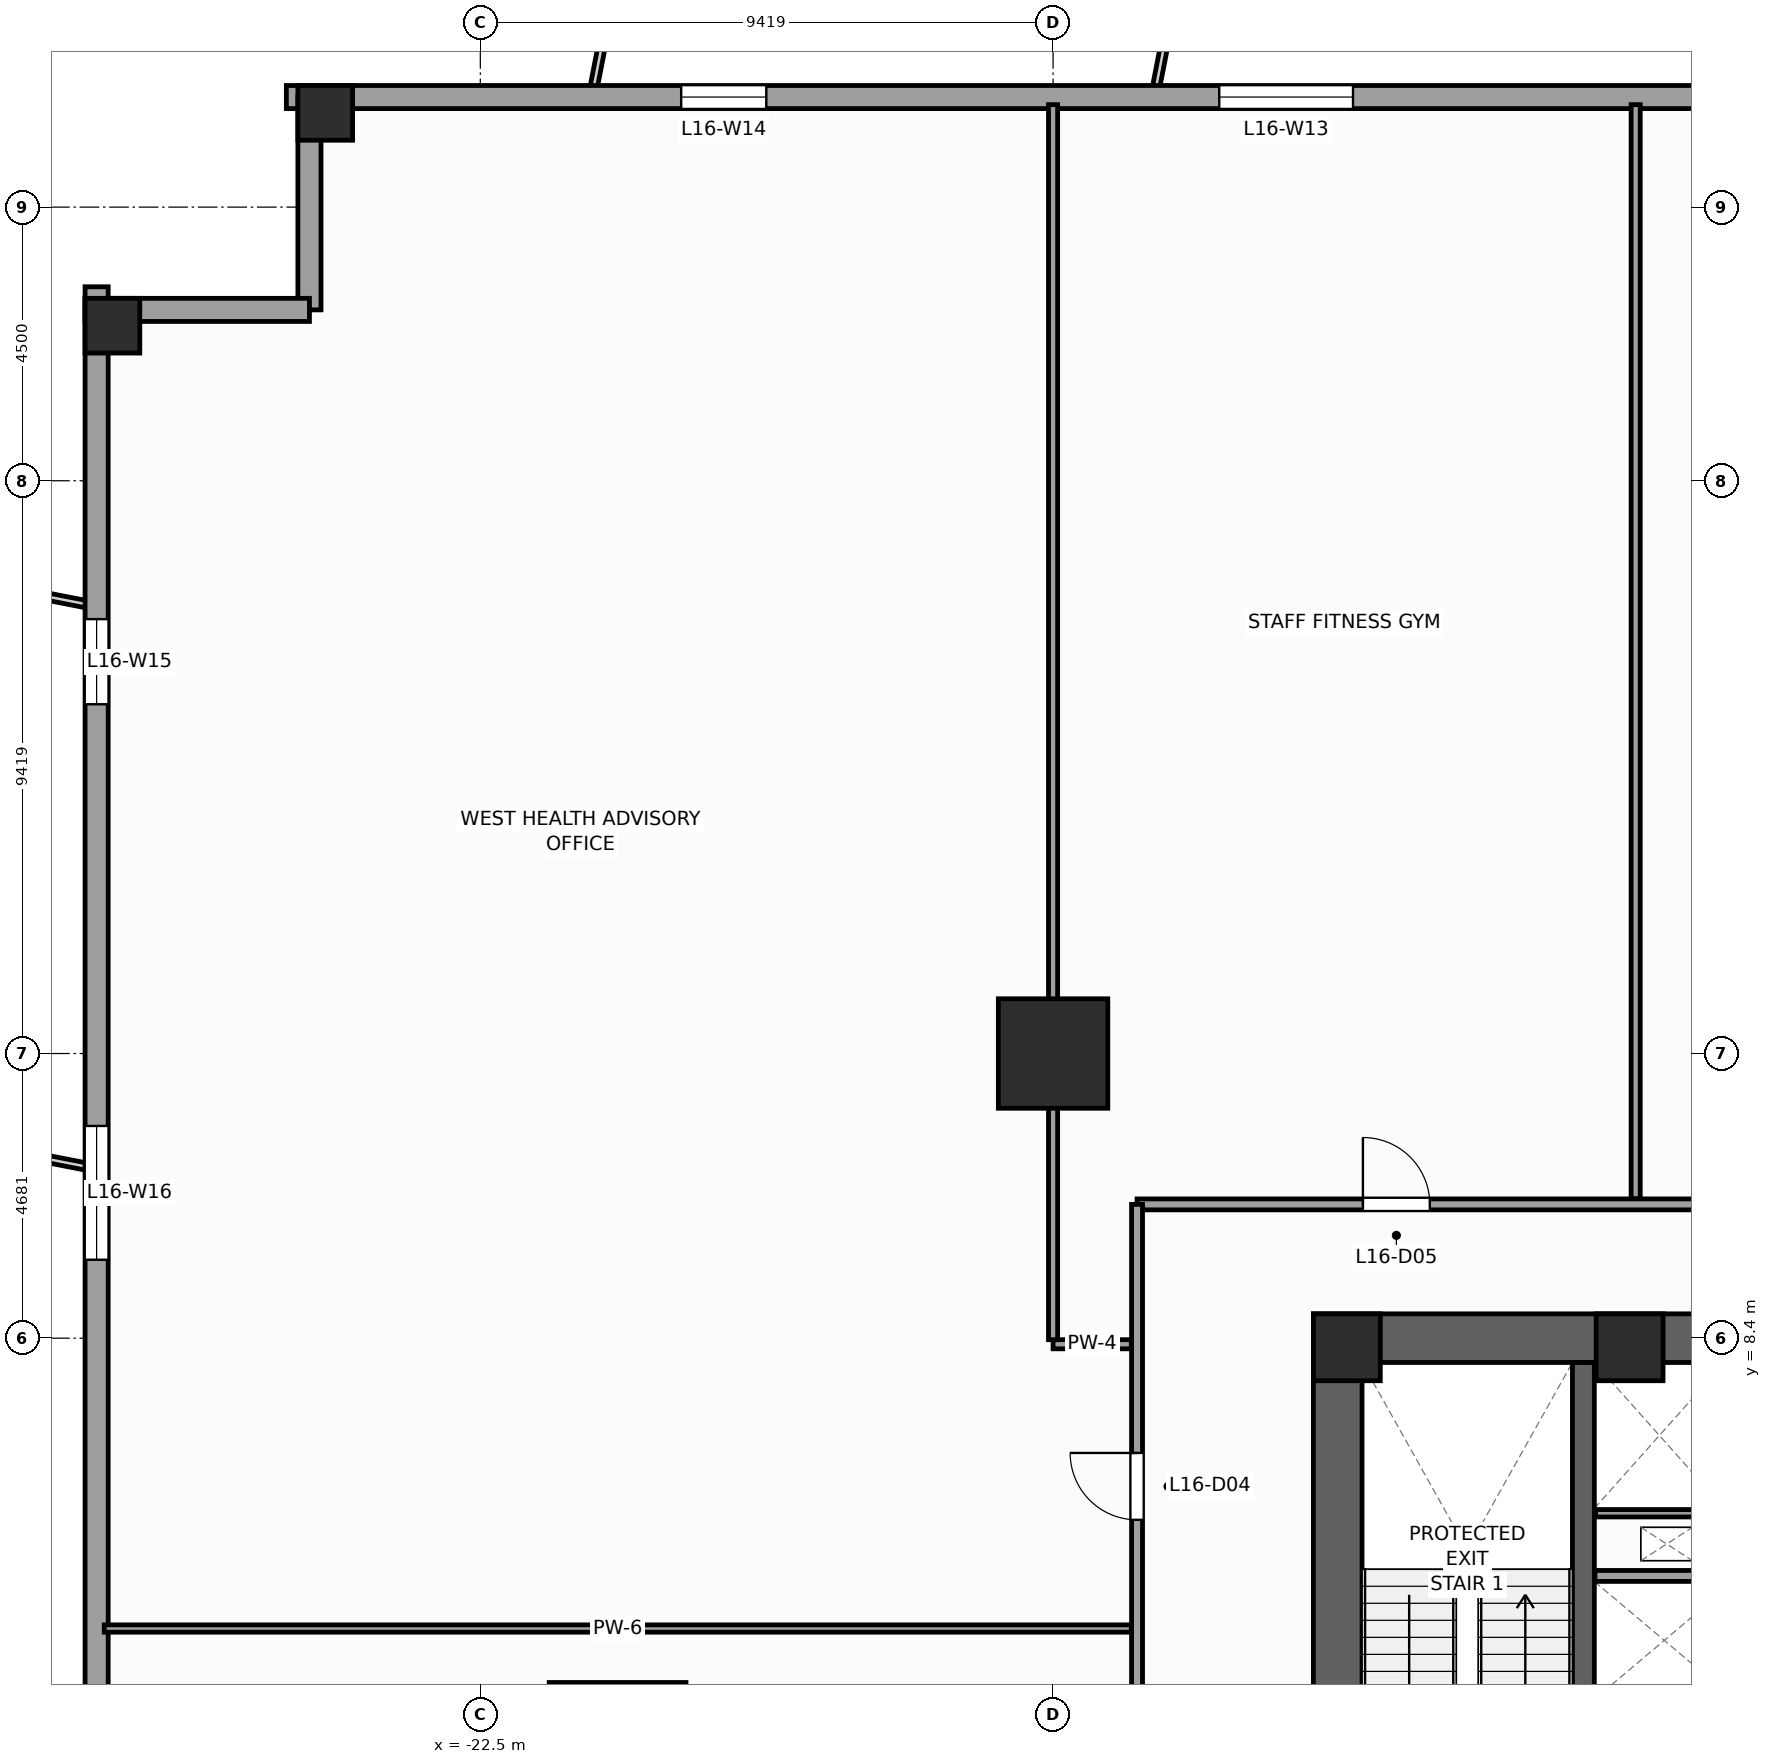
"""IFC4 building model, lengths in metres.
Left out: names, types, materials, properties, quantities, classifications, styles, units other than length and angle.
Written with IfcOpenShell. Run it as: python <this file> out.ifc"""

import sys

from ifc_helpers import new_model, si_unit, direction, frame, frame_2d, origin, origin_2d, place, context, subcontext, project, spatial, rectangle, extrude, source, transform, mapped, element, fill, save


model = new_model("IFC4")
c1 = context("Model", 3, precision=1e-05, world=origin(), true_north=direction((0.0, 1.0)))
c2 = subcontext(c1, "Body", "Model", "MODEL_VIEW")
j1 = project(units=[si_unit("LENGTHUNIT", "METRE"), si_unit("PLANEANGLEUNIT", "RADIAN")], contexts=[c1])
p1 = place(None, origin())
s1 = spatial("IfcSite", under=j1, at=p1, CompositionType="ELEMENT")
p2 = place(p1, origin())
s2 = spatial("IfcBuilding", under=s1, at=p2, CompositionType="ELEMENT")
p3 = place(p2, frame((0.0, 0.0, 70.0)))
s3 = spatial("IfcBuildingStorey", under=s2, at=p3, CompositionType="ELEMENT", Elevation=70.0)
p4 = place(p3, frame((-8.8, 8.4, 0.0), z_axis=(0.0, 0.0, 1.0), x_axis=(1.0, 0.0, 0.0)))
e1 = element("IfcWall", 1, at=p4, inside=s3, PredefinedType="SHEAR", context=c2, shape_type="SweptSolid", body=[
    extrude(rectangle(XDim=17.6, YDim=0.8, at=frame_2d((8.8, 0.0))), origin(), (0.0, 0.0, 1.0), 4.0),
])
p5 = place(p3, frame((-8.4, -8.0, 0.0), z_axis=(0.0, 0.0, 1.0), x_axis=(0.0, 1.0, 0.0)))
e2 = element("IfcWall", 2, at=p5, inside=s3, PredefinedType="SHEAR", context=c2, shape_type="SweptSolid", body=[
    extrude(rectangle(XDim=16.0, YDim=0.8, at=frame_2d((8.0, 0.0))), origin(), (0.0, 0.0, 1.0), 4.0),
])
p6 = place(p5, frame((4.69, 0.0, 0.0)))
e3 = element("IfcOpeningElement", 3, at=p6, cuts=e2, PredefinedType="OPENING", context=c2, shape_type="SweptSolid", body=[
    extrude(rectangle(XDim=1.3, YDim=2.2, at=frame_2d((0.65, 1.1))), frame((0.0, 0.41, 0.0), z_axis=(0.0, -1.0, 0.0), x_axis=(1.0, 0.0, 0.0)), (0.0, 0.0, 1.0), 0.82),
])
p7 = place(p3, frame((-4.36, -8.0, 0.0), z_axis=(0.0, 0.0, 1.0), x_axis=(0.0, 1.0, 0.0)))
e4 = element("IfcWall", 4, at=p7, inside=s3, PredefinedType="SHEAR", context=c2, shape_type="SweptSolid", body=[
    extrude(rectangle(XDim=16.0, YDim=0.36, at=frame_2d((8.0, 0.0))), origin(), (0.0, 0.0, 1.0), 4.0),
])
m1 = source(origin(), c2, "Body", "SweptSolid", [
    extrude(rectangle(XDim=1.1, YDim=1.1, at=origin_2d()), origin(), (0.0, 0.0, 1.0), 4.0),
])
for number, where, z_axis, x_axis in (
    (5, (-8.25, 8.25, 0.0), (0.0, 0.0, 1.0), (1.0, 0.0, 0.0)),
    (6, (-3.6, 8.25, 0.0), (0.0, 0.0, 1.0), (1.0, 0.0, 0.0)),
):
    element("IfcColumn", number, at=place(p3, frame(where, z_axis=z_axis, x_axis=x_axis)), inside=s3, PredefinedType="PILASTER", context=c2, shape_type="MappedRepresentation", body=[
        mapped(m1, transform((0.0, 0.0, 0.0), scale=1.0)),
    ])
m2 = source(origin(), c2, "Body", "SweptSolid", [
    extrude(rectangle(XDim=1.8, YDim=1.8, at=origin_2d()), origin(), (0.0, 0.0, 1.0), 4.0),
])
p8 = place(p3, frame((-13.081, 13.081, 0.0), z_axis=(0.0, 0.0, 1.0), x_axis=(1.0, 0.0, 0.0)))
e7 = element("IfcColumn", 7, at=p8, inside=s3, PredefinedType="COLUMN", context=c2, shape_type="MappedRepresentation", body=[
    mapped(m2, transform((0.0, 0.0, 0.0), scale=1.0)),
])
m3 = source(origin(), c2, "Body", "SweptSolid", [
    extrude(rectangle(XDim=0.9, YDim=0.9, at=origin_2d()), origin(), (0.0, 0.0, 1.0), 4.0),
])
for number, where, z_axis, x_axis in (
    (8, (-25.05, 28.55, 0.0), (0.0, 0.0, 1.0), (1.0, 0.0, 0.0)),
    (9, (-28.55, 25.05, 0.0), (0.0, 0.0, 1.0), (1.0, 0.0, 0.0)),
):
    element("IfcColumn", number, at=place(p3, frame(where, z_axis=z_axis, x_axis=x_axis)), inside=s3, PredefinedType="COLUMN", context=c2, shape_type="MappedRepresentation", body=[
        mapped(m3, transform((0.0, 0.0, 0.0), scale=1.0)),
    ])
p9 = place(p3, frame((25.69, 28.81, 0.0), z_axis=(0.0, 0.0, 1.0), x_axis=(-1.0, 0.0, 0.0)))
e10 = element("IfcWall", 10, at=p9, inside=s3, PredefinedType="STANDARD", context=c2, shape_type="SweptSolid", body=[
    extrude(rectangle(XDim=51.38, YDim=0.38, at=frame_2d((25.69, 0.0))), origin(), (0.0, 0.0, 1.0), 3.12),
])
p10 = place(p9, frame((5.466, 0.0, 0.49)))
e11 = element("IfcOpeningElement", 11, at=p10, cuts=e10, PredefinedType="OPENING", context=c2, shape_type="SweptSolid", body=[
    extrude(rectangle(XDim=1.4, YDim=2.4, at=frame_2d((0.7, 1.2))), frame((0.0, 0.2, 0.0), z_axis=(0.0, -1.0, 0.0), x_axis=(1.0, 0.0, 0.0)), (0.0, 0.0, 1.0), 0.4),
])
p11 = place(p9, frame((13.8, 0.0, 0.49)))
e12 = element("IfcOpeningElement", 12, at=p11, cuts=e10, PredefinedType="OPENING", context=c2, shape_type="SweptSolid", body=[
    extrude(rectangle(XDim=2.2, YDim=2.4, at=frame_2d((1.1, 1.2))), frame((0.0, 0.2, 0.0), z_axis=(0.0, -1.0, 0.0), x_axis=(1.0, 0.0, 0.0)), (0.0, 0.0, 1.0), 0.4),
])
p12 = place(p9, frame((22.062, 0.0, 0.49)))
e13 = element("IfcOpeningElement", 13, at=p12, cuts=e10, PredefinedType="OPENING", context=c2, shape_type="SweptSolid", body=[
    extrude(rectangle(XDim=2.2, YDim=2.4, at=frame_2d((1.1, 1.2))), frame((0.0, 0.2, 0.0), z_axis=(0.0, -1.0, 0.0), x_axis=(1.0, 0.0, 0.0)), (0.0, 0.0, 1.0), 0.4),
])
p13 = place(p9, frame((33.838, 0.0, 0.49)))
e14 = element("IfcOpeningElement", 14, at=p13, cuts=e10, PredefinedType="OPENING", context=c2, shape_type="SweptSolid", body=[
    extrude(rectangle(XDim=2.2, YDim=2.4, at=frame_2d((1.1, 1.2))), frame((0.0, 0.2, 0.0), z_axis=(0.0, -1.0, 0.0), x_axis=(1.0, 0.0, 0.0)), (0.0, 0.0, 1.0), 0.4),
])
p14 = place(p9, frame((43.487, 0.0, 0.49)))
e15 = element("IfcOpeningElement", 15, at=p14, cuts=e10, PredefinedType="OPENING", context=c2, shape_type="SweptSolid", body=[
    extrude(rectangle(XDim=1.4, YDim=2.4, at=frame_2d((0.7, 1.2))), frame((0.0, 0.2, 0.0), z_axis=(0.0, -1.0, 0.0), x_axis=(1.0, 0.0, 0.0)), (0.0, 0.0, 1.0), 0.4),
])
p15 = place(p3, frame((-25.31, 28.81, 0.0), z_axis=(0.0, 0.0, 1.0), x_axis=(0.0, -1.0, 0.0)))
e16 = element("IfcWall", 16, at=p15, inside=s3, PredefinedType="STANDARD", context=c2, shape_type="SweptSolid", body=[
    extrude(rectangle(XDim=3.5, YDim=0.38, at=frame_2d((1.75, 0.0))), origin(), (0.0, 0.0, 1.0), 3.72),
])
p16 = place(p3, frame((-25.31, 25.31, 0.0), z_axis=(0.0, 0.0, 1.0), x_axis=(-1.0, 0.0, 0.0)))
e17 = element("IfcWall", 17, at=p16, inside=s3, PredefinedType="STANDARD", context=c2, shape_type="SweptSolid", body=[
    extrude(rectangle(XDim=3.69, YDim=0.38, at=frame_2d((1.845, 0.0))), origin(), (0.0, 0.0, 1.0), 3.72),
])
p17 = place(p3, frame((-28.81, 25.69, 0.0), z_axis=(0.0, 0.0, 1.0), x_axis=(0.0, -1.0, 0.0)))
e18 = element("IfcWall", 18, at=p17, inside=s3, PredefinedType="STANDARD", context=c2, shape_type="SweptSolid", body=[
    extrude(rectangle(XDim=51.38, YDim=0.38, at=frame_2d((25.69, 0.0))), origin(), (0.0, 0.0, 1.0), 3.12),
])
p18 = place(p17, frame((30.765, 0.0, 0.0)))
e19 = element("IfcOpeningElement", 19, at=p18, cuts=e18, PredefinedType="OPENING", context=c2, shape_type="SweptSolid", body=[
    extrude(rectangle(XDim=1.05, YDim=2.25, at=frame_2d((0.525, 1.125))), frame((0.0, 0.2, 0.0), z_axis=(0.0, -1.0, 0.0), x_axis=(1.0, 0.0, 0.0)), (0.0, 0.0, 1.0), 0.4),
])
p19 = place(p17, frame((5.466, 0.0, 0.49)))
e20 = element("IfcOpeningElement", 20, at=p19, cuts=e18, PredefinedType="OPENING", context=c2, shape_type="SweptSolid", body=[
    extrude(rectangle(XDim=1.4, YDim=2.4, at=frame_2d((0.7, 1.2))), frame((0.0, 0.2, 0.0), z_axis=(0.0, -1.0, 0.0), x_axis=(1.0, 0.0, 0.0)), (0.0, 0.0, 1.0), 0.4),
])
p20 = place(p17, frame((13.8, 0.0, 0.49)))
e21 = element("IfcOpeningElement", 21, at=p20, cuts=e18, PredefinedType="OPENING", context=c2, shape_type="SweptSolid", body=[
    extrude(rectangle(XDim=2.2, YDim=2.4, at=frame_2d((1.1, 1.2))), frame((0.0, 0.2, 0.0), z_axis=(0.0, -1.0, 0.0), x_axis=(1.0, 0.0, 0.0)), (0.0, 0.0, 1.0), 0.4),
])
p21 = place(p17, frame((33.838, 0.0, 0.49)))
e22 = element("IfcOpeningElement", 22, at=p21, cuts=e18, PredefinedType="OPENING", context=c2, shape_type="SweptSolid", body=[
    extrude(rectangle(XDim=2.2, YDim=2.4, at=frame_2d((1.1, 1.2))), frame((0.0, 0.2, 0.0), z_axis=(0.0, -1.0, 0.0), x_axis=(1.0, 0.0, 0.0)), (0.0, 0.0, 1.0), 0.4),
])
p22 = place(p17, frame((43.487, 0.0, 0.49)))
e23 = element("IfcOpeningElement", 23, at=p22, cuts=e18, PredefinedType="OPENING", context=c2, shape_type="SweptSolid", body=[
    extrude(rectangle(XDim=1.4, YDim=2.4, at=frame_2d((0.7, 1.2))), frame((0.0, 0.2, 0.0), z_axis=(0.0, -1.0, 0.0), x_axis=(1.0, 0.0, 0.0)), (0.0, 0.0, 1.0), 0.4),
])
p23 = place(p3, frame((-4.17, 4.49, 0.0), z_axis=(0.0, 0.0, 1.0), x_axis=(1.0, 0.0, 0.0)))
e24 = element("IfcWall", 24, at=p23, inside=s3, PredefinedType="PARTITIONING", context=c2, shape_type="SweptSolid", body=[
    extrude(rectangle(XDim=2.28, YDim=0.18, at=frame_2d((1.14, 0.0))), origin(), (0.0, 0.0, 1.0), 3.72),
])
p24 = place(p3, frame((-4.16, 5.52, 0.0), z_axis=(0.0, 0.0, 1.0), x_axis=(1.0, 0.0, 0.0)))
e25 = element("IfcWall", 25, at=p24, inside=s3, PredefinedType="PARTITIONING", context=c2, shape_type="SweptSolid", body=[
    extrude(rectangle(XDim=2.1, YDim=0.12, at=frame_2d((1.05, 0.0))), origin(), (0.0, 0.0, 1.0), 3.72),
])
p25 = place(p3, frame((-11.7, 10.6, 0.0), z_axis=(0.0, 0.0, 1.0), x_axis=(1.0, 0.0, 0.0)))
e26 = element("IfcWall", 26, at=p25, inside=s3, PredefinedType="PARTITIONING", context=c2, shape_type="SweptSolid", body=[
    extrude(rectangle(XDim=24.45, YDim=0.18, at=frame_2d((12.225, 0.0))), origin(), (0.0, 0.0, 1.0), 3.72),
])
p26 = place(p25, frame((3.714, 0.0, 0.0)))
e27 = element("IfcOpeningElement", 27, at=p26, cuts=e26, PredefinedType="OPENING", context=c2, shape_type="SweptSolid", body=[
    extrude(rectangle(XDim=1.1, YDim=2.2, at=frame_2d((0.55, 1.1))), frame((0.0, 0.1, 0.0), z_axis=(0.0, -1.0, 0.0), x_axis=(1.0, 0.0, 0.0)), (0.0, 0.0, 1.0), 0.2),
])
p27 = place(p25, frame((11.65, 0.0, 0.0)))
e28 = element("IfcOpeningElement", 28, at=p27, cuts=e26, PredefinedType="OPENING", context=c2, shape_type="SweptSolid", body=[
    extrude(rectangle(XDim=1.1, YDim=2.2, at=frame_2d((0.55, 1.1))), frame((0.0, 0.1, 0.0), z_axis=(0.0, -1.0, 0.0), x_axis=(1.0, 0.0, 0.0)), (0.0, 0.0, 1.0), 0.2),
])
p28 = place(p25, frame((19.611, 0.0, 0.0)))
e29 = element("IfcOpeningElement", 29, at=p28, cuts=e26, PredefinedType="OPENING", context=c2, shape_type="SweptSolid", body=[
    extrude(rectangle(XDim=1.1, YDim=2.2, at=frame_2d((0.55, 1.1))), frame((0.0, 0.1, 0.0), z_axis=(0.0, -1.0, 0.0), x_axis=(1.0, 0.0, 0.0)), (0.0, 0.0, 1.0), 0.2),
])
p29 = place(p3, frame((-11.7, -1.05, 0.0), z_axis=(0.0, 0.0, 1.0), x_axis=(0.0, 1.0, 0.0)))
e30 = element("IfcWall", 30, at=p29, inside=s3, PredefinedType="PARTITIONING", context=c2, shape_type="SweptSolid", body=[
    extrude(rectangle(XDim=11.65, YDim=0.18, at=frame_2d((5.825, 0.0))), origin(), (0.0, 0.0, 1.0), 3.72),
])
p30 = place(p29, frame((1.455, 0.0, 0.0)))
e31 = element("IfcOpeningElement", 31, at=p30, cuts=e30, PredefinedType="OPENING", context=c2, shape_type="SweptSolid", body=[
    extrude(rectangle(XDim=0.95, YDim=2.1, at=frame_2d((0.475, 1.05))), frame((0.0, 0.1, 0.0), z_axis=(0.0, -1.0, 0.0), x_axis=(1.0, 0.0, 0.0)), (0.0, 0.0, 1.0), 0.2),
])
p31 = place(p29, frame((6.462, 0.0, 0.0)))
e32 = element("IfcOpeningElement", 32, at=p31, cuts=e30, PredefinedType="OPENING", context=c2, shape_type="SweptSolid", body=[
    extrude(rectangle(XDim=1.1, YDim=2.2, at=frame_2d((0.55, 1.1))), frame((0.0, 0.1, 0.0), z_axis=(0.0, -1.0, 0.0), x_axis=(1.0, 0.0, 0.0)), (0.0, 0.0, 1.0), 0.2),
])
p32 = place(p3, frame((-11.795, 8.3, 0.0), z_axis=(0.0, 0.0, 1.0), x_axis=(-1.0, 0.0, 0.0)))
e33 = element("IfcWall", 33, at=p32, inside=s3, PredefinedType="PARTITIONING", context=c2, shape_type="SweptSolid", body=[
    extrude(rectangle(XDim=1.286, YDim=0.15, at=frame_2d((0.643, 0.0))), origin(), (0.0, 0.0, 1.0), 3.72),
])
p33 = place(p3, frame((-13.081, 8.375, 0.0), z_axis=(0.0, 0.0, 1.0), x_axis=(0.0, 1.0, 0.0)))
e34 = element("IfcWall", 34, at=p33, inside=s3, PredefinedType="PARTITIONING", context=c2, shape_type="SweptSolid", body=[
    extrude(rectangle(XDim=20.31, YDim=0.15, at=frame_2d((10.155, 0.0))), origin(), (0.0, 0.0, 1.0), 2.712),
])
p34 = place(p3, frame((-3.5, 10.695, 0.0), z_axis=(0.0, 0.0, 1.0), x_axis=(0.0, 1.0, 0.0)))
e35 = element("IfcWall", 35, at=p34, inside=s3, PredefinedType="PARTITIONING", context=c2, shape_type="SweptSolid", body=[
    extrude(rectangle(XDim=17.99, YDim=0.15, at=frame_2d((8.995, 0.0))), origin(), (0.0, 0.0, 1.0), 3.72),
])
p35 = place(p3, frame((-28.685, 3.625, 0.0), z_axis=(0.0, 0.0, 1.0), x_axis=(1.0, 0.0, 0.0)))
e36 = element("IfcWall", 36, at=p35, inside=s3, PredefinedType="PARTITIONING", context=c2, shape_type="SweptSolid", body=[
    extrude(rectangle(XDim=16.89, YDim=0.12, at=frame_2d((8.445, 0.0))), origin(), (0.0, 0.0, 1.0), 3.72),
])
p36 = place(p3, frame((-21.367, 2.67, 0.0), z_axis=(0.0, 0.0, 1.0), x_axis=(1.0, 0.0, 0.0)))
e37 = element("IfcWall", 37, at=p36, inside=s3, PredefinedType="PARTITIONING", context=c2, shape_type="SweptSolid", body=[
    extrude(rectangle(XDim=2.25, YDim=0.135, at=frame_2d((1.125, 0.0))), origin(), (0.0, 0.0, 1.0), 3.72),
])
m4 = source(origin(), c2, "Body", "SweptSolid", [
    extrude(rectangle(XDim=2.2, YDim=2.4, at=frame_2d((1.1, 1.2))), frame((0.0, 0.03, 0.0), z_axis=(0.0, -1.0, 0.0), x_axis=(1.0, 0.0, 0.0)), (0.0, 0.0, 1.0), 0.06),
])
p37 = place(p13, origin())
e38 = element("IfcWindow", 38, at=p37, inside=s3, PartitioningType="SINGLE_PANEL", PredefinedType="WINDOW", context=c2, shape_type="MappedRepresentation", body=[
    mapped(m4, transform((0.0, 0.0, 0.0), scale=1.0)),
])
fill(e14, e38)
m5 = source(origin(), c2, "Body", "SweptSolid", [
    extrude(rectangle(XDim=1.4, YDim=2.4, at=frame_2d((0.7, 1.2))), frame((0.0, 0.03, 0.0), z_axis=(0.0, -1.0, 0.0), x_axis=(1.0, 0.0, 0.0)), (0.0, 0.0, 1.0), 0.06),
])
p38 = place(p14, origin())
e39 = element("IfcWindow", 39, at=p38, inside=s3, PartitioningType="SINGLE_PANEL", PredefinedType="WINDOW", context=c2, shape_type="MappedRepresentation", body=[
    mapped(m5, transform((0.0, 0.0, 0.0), scale=1.0)),
])
fill(e15, e39)
p39 = place(p19, origin())
e40 = element("IfcWindow", 40, at=p39, inside=s3, PartitioningType="SINGLE_PANEL", PredefinedType="WINDOW", context=c2, shape_type="MappedRepresentation", body=[
    mapped(m5, transform((0.0, 0.0, 0.0), scale=1.0)),
])
fill(e20, e40)
p40 = place(p20, origin())
e41 = element("IfcWindow", 41, at=p40, inside=s3, PartitioningType="SINGLE_PANEL", PredefinedType="WINDOW", context=c2, shape_type="MappedRepresentation", body=[
    mapped(m4, transform((0.0, 0.0, 0.0), scale=1.0)),
])
fill(e21, e41)
m6 = source(origin(), c2, "Body", "SweptSolid", [
    extrude(rectangle(XDim=1.1, YDim=2.2, at=frame_2d((0.55, 1.1))), frame((0.0, 0.025, 0.0), z_axis=(0.0, -1.0, 0.0), x_axis=(1.0, 0.0, 0.0)), (0.0, 0.0, 1.0), 0.05),
])
p41 = place(p31, origin())
e42 = element("IfcDoor", 42, at=p41, inside=s3, OperationType="SINGLE_SWING_RIGHT", PredefinedType="DOOR", context=c2, shape_type="MappedRepresentation", body=[
    mapped(m6, transform((0.0, 0.0, 0.0), scale=1.0)),
])
fill(e32, e42)
p42 = place(p26, origin())
e43 = element("IfcDoor", 43, at=p42, inside=s3, OperationType="SINGLE_SWING_LEFT", PredefinedType="DOOR", context=c2, shape_type="MappedRepresentation", body=[
    mapped(m6, transform((0.0, 0.0, 0.0), scale=1.0)),
])
fill(e27, e43)
save(model, sys.argv[1])
